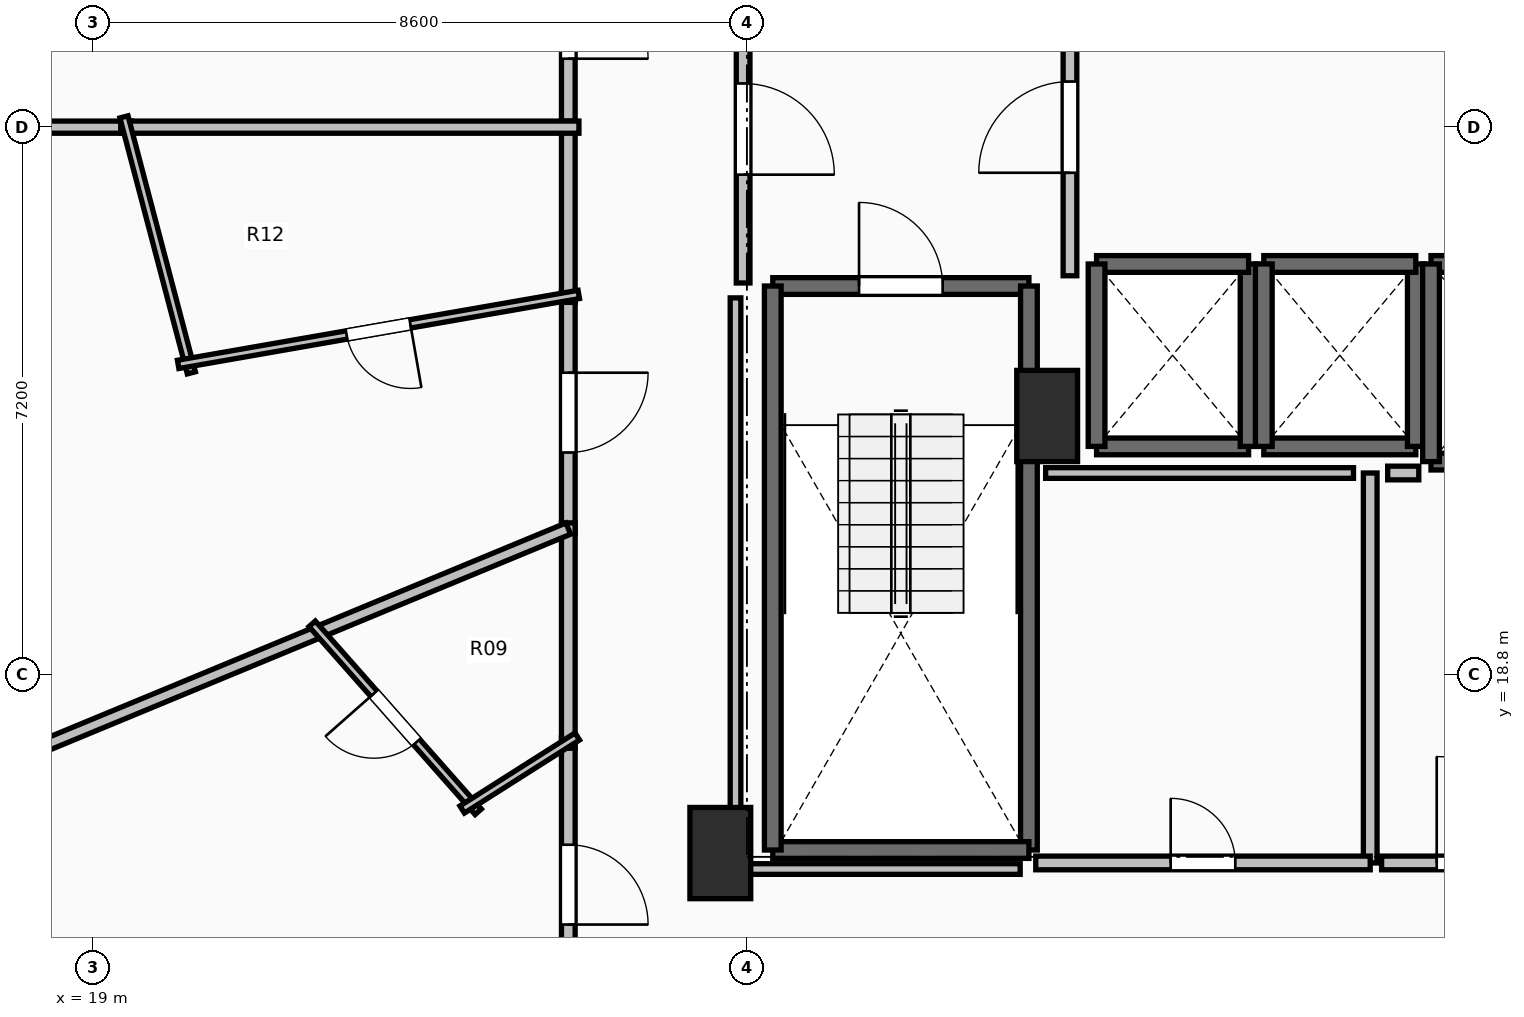
"""IFC4 building model, lengths in metres.
Left out: names, types, materials, properties, quantities, classifications, styles, units other than length and angle.
Written with IfcOpenShell. Run it as: python <this file> out.ifc"""

import sys

from ifc_helpers import new_model, si_unit, direction, frame, frame_2d, origin, origin_2d, place, context, subcontext, project, spatial, rectangle, extrude, element, fill, save


model = new_model("IFC4")
c1 = context("Model", 3, precision=1e-05, world=origin(), true_north=direction((0.0, 1.0)))
c2 = subcontext(c1, "Body", "Model", "MODEL_VIEW")
j1 = project(units=[si_unit("LENGTHUNIT", "METRE"), si_unit("PLANEANGLEUNIT", "RADIAN")], contexts=[c1])
p1 = place(None, origin())
s1 = spatial("IfcSite", under=j1, at=p1, CompositionType="ELEMENT")
p2 = place(p1, origin())
s2 = spatial("IfcBuilding", under=s1, at=p2, CompositionType="ELEMENT")
p3 = place(p2, frame((0.0, 0.0, 24.0)))
s3 = spatial("IfcBuildingStorey", under=s2, at=p3, CompositionType="ELEMENT", Elevation=24.0)
for number, where, z_axis, x_axis in (
    (1, (27.25, 16.45, 0.0), (0.0, 0.0, 1.0), (1.0, 0.0, 0.0)),
    (2, (31.55, 22.2, 0.0), (0.0, 0.0, 1.0), (1.0, 0.0, 0.0)),
):
    element("IfcColumn", number, at=place(p3, frame(where, z_axis=z_axis, x_axis=x_axis)), inside=s3, PredefinedType="PILASTER", context=c2, shape_type="SweptSolid", body=[
        extrude(rectangle(XDim=0.8, YDim=1.2, at=origin_2d()), origin(), (0.0, 0.0, 1.0), 3.5),
    ])
p4 = place(p3, frame((27.94, 23.91, 0.0), z_axis=(0.0, 0.0, 1.0), x_axis=(1.0, 0.0, 0.0)))
e3 = element("IfcWall", 3, at=p4, inside=s3, PredefinedType="SOLIDWALL", context=c2, shape_type="SweptSolid", body=[
    extrude(rectangle(XDim=3.37, YDim=0.22, at=frame_2d((1.685, 0.0))), origin(), (0.0, 0.0, 1.0), 3.24),
])
p5 = place(p4, frame((1.135, 0.0, 0.0)))
e4 = element("IfcOpeningElement", 4, at=p5, cuts=e3, PredefinedType="OPENING", context=c2, shape_type="SweptSolid", body=[
    extrude(rectangle(XDim=1.1, YDim=2.15, at=frame_2d((0.55, 1.075))), frame((0.0, 0.125, 0.0), z_axis=(0.0, -1.0, 0.0), x_axis=(1.0, 0.0, 0.0)), (0.0, 0.0, 1.0), 0.25),
])
p6 = place(p3, frame((31.31, 23.91, 0.0), z_axis=(0.0, 0.0, 1.0), x_axis=(0.0, -1.0, 0.0)))
e5 = element("IfcWall", 5, at=p6, inside=s3, PredefinedType="SOLIDWALL", context=c2, shape_type="SweptSolid", body=[
    extrude(rectangle(XDim=7.42, YDim=0.22, at=frame_2d((3.71, 0.0))), origin(), (0.0, 0.0, 1.0), 3.24),
])
p7 = place(p3, frame((31.31, 16.49, 0.0), z_axis=(0.0, 0.0, 1.0), x_axis=(-1.0, 0.0, 0.0)))
e6 = element("IfcWall", 6, at=p7, inside=s3, PredefinedType="SOLIDWALL", context=c2, shape_type="SweptSolid", body=[
    extrude(rectangle(XDim=3.37, YDim=0.22, at=frame_2d((1.685, 0.0))), origin(), (0.0, 0.0, 1.0), 3.24),
])
p8 = place(p3, frame((27.94, 16.49, 0.0), z_axis=(0.0, 0.0, 1.0), x_axis=(0.0, 1.0, 0.0)))
e7 = element("IfcWall", 7, at=p8, inside=s3, PredefinedType="SOLIDWALL", context=c2, shape_type="SweptSolid", body=[
    extrude(rectangle(XDim=7.42, YDim=0.22, at=frame_2d((3.71, 0.0))), origin(), (0.0, 0.0, 1.0), 3.24),
])
p9 = place(p3, frame((32.2, 21.8, 0.0), z_axis=(0.0, 0.0, 1.0), x_axis=(1.0, 0.0, 0.0)))
e8 = element("IfcWall", 8, at=p9, inside=s3, PredefinedType="SOLIDWALL", context=c2, shape_type="SweptSolid", body=[
    extrude(rectangle(XDim=2.0, YDim=0.22, at=frame_2d((1.0, 0.0))), origin(), (0.0, 0.0, 1.0), 3.24),
])
p10 = place(p3, frame((34.2, 21.8, 0.0), z_axis=(0.0, 0.0, 1.0), x_axis=(0.0, 1.0, 0.0)))
e9 = element("IfcWall", 9, at=p10, inside=s3, PredefinedType="SOLIDWALL", context=c2, shape_type="SweptSolid", body=[
    extrude(rectangle(XDim=2.4, YDim=0.22, at=frame_2d((1.2, 0.0))), origin(), (0.0, 0.0, 1.0), 3.24),
])
p11 = place(p3, frame((34.2, 24.2, 0.0), z_axis=(0.0, 0.0, 1.0), x_axis=(-1.0, 0.0, 0.0)))
e10 = element("IfcWall", 10, at=p11, inside=s3, PredefinedType="SOLIDWALL", context=c2, shape_type="SweptSolid", body=[
    extrude(rectangle(XDim=2.0, YDim=0.22, at=frame_2d((1.0, 0.0))), origin(), (0.0, 0.0, 1.0), 3.24),
])
p12 = place(p3, frame((32.2, 24.2, 0.0), z_axis=(0.0, 0.0, 1.0), x_axis=(0.0, -1.0, 0.0)))
e11 = element("IfcWall", 11, at=p12, inside=s3, PredefinedType="SOLIDWALL", context=c2, shape_type="SweptSolid", body=[
    extrude(rectangle(XDim=2.4, YDim=0.22, at=frame_2d((1.2, 0.0))), origin(), (0.0, 0.0, 1.0), 3.24),
])
p13 = place(p3, frame((34.4, 21.8, 0.0), z_axis=(0.0, 0.0, 1.0), x_axis=(1.0, 0.0, 0.0)))
e12 = element("IfcWall", 12, at=p13, inside=s3, PredefinedType="SOLIDWALL", context=c2, shape_type="SweptSolid", body=[
    extrude(rectangle(XDim=2.0, YDim=0.22, at=frame_2d((1.0, 0.0))), origin(), (0.0, 0.0, 1.0), 3.24),
])
p14 = place(p3, frame((36.4, 21.8, 0.0), z_axis=(0.0, 0.0, 1.0), x_axis=(0.0, 1.0, 0.0)))
e13 = element("IfcWall", 13, at=p14, inside=s3, PredefinedType="SOLIDWALL", context=c2, shape_type="SweptSolid", body=[
    extrude(rectangle(XDim=2.4, YDim=0.22, at=frame_2d((1.2, 0.0))), origin(), (0.0, 0.0, 1.0), 3.24),
])
p15 = place(p3, frame((36.4, 24.2, 0.0), z_axis=(0.0, 0.0, 1.0), x_axis=(-1.0, 0.0, 0.0)))
e14 = element("IfcWall", 14, at=p15, inside=s3, PredefinedType="SOLIDWALL", context=c2, shape_type="SweptSolid", body=[
    extrude(rectangle(XDim=2.0, YDim=0.22, at=frame_2d((1.0, 0.0))), origin(), (0.0, 0.0, 1.0), 3.24),
])
p16 = place(p3, frame((34.4, 24.2, 0.0), z_axis=(0.0, 0.0, 1.0), x_axis=(0.0, -1.0, 0.0)))
e15 = element("IfcWall", 15, at=p16, inside=s3, PredefinedType="SOLIDWALL", context=c2, shape_type="SweptSolid", body=[
    extrude(rectangle(XDim=2.4, YDim=0.22, at=frame_2d((1.2, 0.0))), origin(), (0.0, 0.0, 1.0), 3.24),
])
for number, where, z_axis, x_axis in (
    (16, (36.6, 21.6, 0.0), (0.0, 0.0, 1.0), (1.0, 0.0, 0.0)),
    (17, (38.8, 24.2, 0.0), (0.0, 0.0, 1.0), (-1.0, 0.0, 0.0)),
):
    element("IfcWall", number, at=place(p3, frame(where, z_axis=z_axis, x_axis=x_axis)), inside=s3, PredefinedType="SOLIDWALL", context=c2, shape_type="SweptSolid", body=[
        extrude(rectangle(XDim=2.2, YDim=0.22, at=frame_2d((1.1, 0.0))), origin(), (0.0, 0.0, 1.0), 3.24),
    ])
p17 = place(p3, frame((36.6, 24.2, 0.0), z_axis=(0.0, 0.0, 1.0), x_axis=(0.0, -1.0, 0.0)))
e18 = element("IfcWall", 18, at=p17, inside=s3, PredefinedType="SOLIDWALL", context=c2, shape_type="SweptSolid", body=[
    extrude(rectangle(XDim=2.6, YDim=0.22, at=frame_2d((1.3, 0.0))), origin(), (0.0, 0.0, 1.0), 3.24),
])
p18 = place(p3, frame((31.85, 24.045, 0.0), z_axis=(0.0, 0.0, 1.0), x_axis=(0.0, 1.0, 0.0)))
e19 = element("IfcWall", 19, at=p18, inside=s3, PredefinedType="PARTITIONING", context=c2, shape_type="SweptSolid", body=[
    extrude(rectangle(XDim=3.91, YDim=0.18, at=frame_2d((1.955, 0.0))), origin(), (0.0, 0.0, 1.0), 3.24),
])
p19 = place(p18, frame((1.355, 0.0, 0.0)))
e20 = element("IfcOpeningElement", 20, at=p19, cuts=e19, PredefinedType="OPENING", context=c2, shape_type="SweptSolid", body=[
    extrude(rectangle(XDim=1.2, YDim=2.15, at=frame_2d((0.6, 1.075))), frame((0.0, 0.105, 0.0), z_axis=(0.0, -1.0, 0.0), x_axis=(1.0, 0.0, 0.0)), (0.0, 0.0, 1.0), 0.21),
])
p20 = place(p3, frame((27.55, 28.0, 0.0), z_axis=(0.0, 0.0, 1.0), x_axis=(0.0, -1.0, 0.0)))
e21 = element("IfcWall", 21, at=p20, inside=s3, PredefinedType="PARTITIONING", context=c2, shape_type="SweptSolid", body=[
    extrude(rectangle(XDim=4.05, YDim=0.18, at=frame_2d((2.025, 0.0))), origin(), (0.0, 0.0, 1.0), 3.24),
])
p21 = place(p20, frame((1.425, 0.0, 0.0)))
e22 = element("IfcOpeningElement", 22, at=p21, cuts=e21, PredefinedType="OPENING", context=c2, shape_type="SweptSolid", body=[
    extrude(rectangle(XDim=1.2, YDim=2.15, at=frame_2d((0.6, 1.075))), frame((0.0, 0.105, 0.0), z_axis=(0.0, -1.0, 0.0), x_axis=(1.0, 0.0, 0.0)), (0.0, 0.0, 1.0), 0.21),
])
p22 = place(p3, frame((35.8, 16.32, 0.0), z_axis=(0.0, 0.0, 1.0), x_axis=(0.0, 1.0, 0.0)))
e23 = element("IfcWall", 23, at=p22, inside=s3, PredefinedType="PARTITIONING", context=c2, shape_type="SweptSolid", body=[
    extrude(rectangle(XDim=5.13, YDim=0.18, at=frame_2d((2.565, 0.0))), origin(), (0.0, 0.0, 1.0), 3.24),
])
p23 = place(p3, frame((31.4, 16.32, 0.0), z_axis=(0.0, 0.0, 1.0), x_axis=(1.0, 0.0, 0.0)))
e24 = element("IfcWall", 24, at=p23, inside=s3, PredefinedType="PARTITIONING", context=c2, shape_type="SweptSolid", body=[
    extrude(rectangle(XDim=4.4, YDim=0.18, at=frame_2d((2.2, 0.0))), origin(), (0.0, 0.0, 1.0), 3.24),
])
p24 = place(p23, frame((1.775, 0.0, 0.0)))
e25 = element("IfcOpeningElement", 25, at=p24, cuts=e24, PredefinedType="OPENING", context=c2, shape_type="SweptSolid", body=[
    extrude(rectangle(XDim=0.85, YDim=2.1, at=frame_2d((0.425, 1.05))), frame((0.0, 0.105, 0.0), z_axis=(0.0, -1.0, 0.0), x_axis=(1.0, 0.0, 0.0)), (0.0, 0.0, 1.0), 0.21),
])
p25 = place(p3, frame((35.95, 16.32, 0.0), z_axis=(0.0, 0.0, 1.0), x_axis=(1.0, 0.0, 0.0)))
e26 = element("IfcWall", 26, at=p25, inside=s3, PredefinedType="PARTITIONING", context=c2, shape_type="SweptSolid", body=[
    extrude(rectangle(XDim=2.85, YDim=0.18, at=frame_2d((1.425, 0.0))), origin(), (0.0, 0.0, 1.0), 3.24),
])
p26 = place(p25, frame((0.725, 0.0, 0.0)))
e27 = element("IfcOpeningElement", 27, at=p26, cuts=e26, PredefinedType="OPENING", context=c2, shape_type="SweptSolid", body=[
    extrude(rectangle(XDim=1.4, YDim=2.2, at=frame_2d((0.7, 1.1))), frame((0.0, 0.105, 0.0), z_axis=(0.0, -1.0, 0.0), x_axis=(1.0, 0.0, 0.0)), (0.0, 0.0, 1.0), 0.21),
])
p27 = place(p3, frame((25.25, 28.911, 0.0), z_axis=(0.0, 0.0, 1.0), x_axis=(0.0, -1.0, 0.0)))
e28 = element("IfcWall", 28, at=p27, inside=s3, PredefinedType="PARTITIONING", context=c2, shape_type="SweptSolid", body=[
    extrude(rectangle(XDim=2.971, YDim=0.18, at=frame_2d((1.485, 0.0))), origin(), (0.0, 0.0, 1.0), 2.432),
])
p28 = place(p27, frame((0.96, 0.0, 0.0)))
e29 = element("IfcOpeningElement", 29, at=p28, cuts=e28, PredefinedType="OPENING", context=c2, shape_type="SweptSolid", body=[
    extrude(rectangle(XDim=1.05, YDim=2.2, at=frame_2d((0.525, 1.1))), frame((0.0, 0.105, 0.0), z_axis=(0.0, -1.0, 0.0), x_axis=(1.0, 0.0, 0.0)), (0.0, 0.0, 1.0), 0.21),
])
p29 = place(p3, frame((25.25, 23.835, 0.0), z_axis=(0.0, 0.0, 1.0), x_axis=(0.0, -1.0, 0.0)))
e30 = element("IfcWall", 30, at=p29, inside=s3, PredefinedType="PARTITIONING", context=c2, shape_type="SweptSolid", body=[
    extrude(rectangle(XDim=3.181, YDim=0.18, at=frame_2d((1.59, 0.0))), origin(), (0.0, 0.0, 1.0), 3.24),
])
p30 = place(p29, frame((1.065, 0.0, 0.0)))
e31 = element("IfcOpeningElement", 31, at=p30, cuts=e30, PredefinedType="OPENING", context=c2, shape_type="SweptSolid", body=[
    extrude(rectangle(XDim=1.05, YDim=2.2, at=frame_2d((0.525, 1.1))), frame((0.0, 0.105, 0.0), z_axis=(0.0, -1.0, 0.0), x_axis=(1.0, 0.0, 0.0)), (0.0, 0.0, 1.0), 0.21),
])
p31 = place(p3, frame((25.25, 26.08, 0.0), z_axis=(0.0, 0.0, 1.0), x_axis=(0.0, -1.0, 0.0)))
e32 = element("IfcWall", 32, at=p31, inside=s3, PredefinedType="PARTITIONING", context=c2, shape_type="SweptSolid", body=[
    extrude(rectangle(XDim=2.385, YDim=0.18, at=frame_2d((1.192, 0.0))), origin(), (0.0, 0.0, 1.0), 3.24),
])
p32 = place(p3, frame((25.25, 17.969, 0.0), z_axis=(0.0, 0.0, 1.0), x_axis=(0.0, -1.0, 0.0)))
e33 = element("IfcWall", 33, at=p32, inside=s3, PredefinedType="PARTITIONING", context=c2, shape_type="SweptSolid", body=[
    extrude(rectangle(XDim=3.869, YDim=0.18, at=frame_2d((1.935, 0.0))), origin(), (0.0, 0.0, 1.0), 2.432),
])
p33 = place(p32, frame((1.409, 0.0, 0.0)))
e34 = element("IfcOpeningElement", 34, at=p33, cuts=e33, PredefinedType="OPENING", context=c2, shape_type="SweptSolid", body=[
    extrude(rectangle(XDim=1.05, YDim=2.2, at=frame_2d((0.525, 1.1))), frame((0.0, 0.105, 0.0), z_axis=(0.0, -1.0, 0.0), x_axis=(1.0, 0.0, 0.0)), (0.0, 0.0, 1.0), 0.21),
])
p34 = place(p3, frame((25.25, 20.794, 0.0), z_axis=(0.0, 0.0, 1.0), x_axis=(0.0, -1.0, 0.0)))
e35 = element("IfcWall", 35, at=p34, inside=s3, PredefinedType="PARTITIONING", context=c2, shape_type="SweptSolid", body=[
    extrude(rectangle(XDim=2.965, YDim=0.18, at=frame_2d((1.482, 0.0))), origin(), (0.0, 0.0, 1.0), 3.24),
])
p35 = place(p3, frame((8.451, 26.0, 0.0), z_axis=(0.0, 0.0, 1.0), x_axis=(1.0, 0.0, 0.0)))
e36 = element("IfcWall", 36, at=p35, inside=s3, PredefinedType="PARTITIONING", context=c2, shape_type="SweptSolid", body=[
    extrude(rectangle(XDim=11.051, YDim=0.16, at=frame_2d((5.525, 0.0))), origin(), (0.0, 0.0, 1.0), 2.432),
])
p36 = place(p3, frame((19.362, 26.0, 0.0), z_axis=(0.0, 0.0, 1.0), x_axis=(1.0, 0.0, 0.0)))
e37 = element("IfcWall", 37, at=p36, inside=s3, PredefinedType="PARTITIONING", context=c2, shape_type="SweptSolid", body=[
    extrude(rectangle(XDim=6.028, YDim=0.16, at=frame_2d((3.014, 0.0))), origin(), (0.0, 0.0, 1.0), 2.922),
])
p37 = place(p3, frame((20.291, 22.768, 0.0), z_axis=(0.0, 0.0, 1.0), x_axis=(-0.254476045764, 0.967079077497, 0.0)))
e38 = element("IfcWall", 38, at=p37, inside=s3, PredefinedType="PARTITIONING", context=c2, shape_type="SweptSolid", body=[
    extrude(rectangle(XDim=3.483, YDim=0.11, at=frame_2d((1.741, 0.0))), origin(), (0.0, 0.0, 1.0), 3.24),
])
p38 = place(p3, frame((25.388, 23.799, 0.0), z_axis=(0.0, 0.0, 1.0), x_axis=(-0.985100697644, -0.171978532096, 0.0)))
e39 = element("IfcWall", 39, at=p38, inside=s3, PredefinedType="PARTITIONING", context=c2, shape_type="SweptSolid", body=[
    extrude(rectangle(XDim=5.351, YDim=0.11, at=frame_2d((2.675, 0.0))), origin(), (0.0, 0.0, 1.0), 2.922),
])
p39 = place(p38, frame((2.25, 0.0, 0.0)))
e40 = element("IfcOpeningElement", 40, at=p39, cuts=e39, PredefinedType="OPENING", context=c2, shape_type="SweptSolid", body=[
    extrude(rectangle(XDim=0.85, YDim=2.1, at=frame_2d((0.425, 1.05))), frame((0.0, 0.07, 0.0), z_axis=(0.0, -1.0, 0.0), x_axis=(1.0, 0.0, 0.0)), (0.0, 0.0, 1.0), 0.14),
])
p40 = place(p3, frame((12.207, 15.316, 0.0), z_axis=(0.0, 0.0, 1.0), x_axis=(0.923866969846, 0.382713759914, 0.0)))
e41 = element("IfcWall", 41, at=p40, inside=s3, PredefinedType="PARTITIONING", context=c2, shape_type="SweptSolid", body=[
    extrude(rectangle(XDim=14.118, YDim=0.16, at=frame_2d((7.059, 0.0))), origin(), (0.0, 0.0, 1.0), 2.432),
])
p41 = place(p3, frame((24.065, 16.993, 0.0), z_axis=(0.0, 0.0, 1.0), x_axis=(-0.662059609276, 0.749451181709, 0.0)))
e42 = element("IfcWall", 42, at=p41, inside=s3, PredefinedType="PARTITIONING", context=c2, shape_type="SweptSolid", body=[
    extrude(rectangle(XDim=3.299, YDim=0.11, at=frame_2d((1.65, 0.0))), origin(), (0.0, 0.0, 1.0), 2.432),
])
p42 = place(p41, frame((1.225, 0.0, 0.0)))
e43 = element("IfcOpeningElement", 43, at=p42, cuts=e42, PredefinedType="OPENING", context=c2, shape_type="SweptSolid", body=[
    extrude(rectangle(XDim=0.85, YDim=2.1, at=frame_2d((0.425, 1.05))), frame((0.0, 0.07, 0.0), z_axis=(0.0, -1.0, 0.0), x_axis=(1.0, 0.0, 0.0)), (0.0, 0.0, 1.0), 0.14),
])
p43 = place(p3, frame((25.368, 17.984, 0.0), z_axis=(0.0, 0.0, 1.0), x_axis=(-0.844361394482, -0.535774052665, 0.0)))
e44 = element("IfcWall", 44, at=p43, inside=s3, PredefinedType="PARTITIONING", context=c2, shape_type="SweptSolid", body=[
    extrude(rectangle(XDim=1.793, YDim=0.11, at=frame_2d((0.897, 0.0))), origin(), (0.0, 0.0, 1.0), 2.432),
])
p44 = place(p3, frame((35.58, 21.45, 0.0), z_axis=(0.0, 0.0, 1.0), x_axis=(-1.0, 0.0, 0.0)))
e45 = element("IfcWall", 45, at=p44, inside=s3, PredefinedType="PARTITIONING", context=c2, shape_type="SweptSolid", body=[
    extrude(rectangle(XDim=4.05, YDim=0.14, at=frame_2d((2.025, 0.0))), origin(), (0.0, 0.0, 1.0), 3.24),
])
p45 = place(p3, frame((36.439, 21.45, 0.0), z_axis=(0.0, 0.0, 1.0), x_axis=(-1.0, 0.0, 0.0)))
e46 = element("IfcWall", 46, at=p45, inside=s3, PredefinedType="PARTITIONING", context=c2, shape_type="SweptSolid", body=[
    extrude(rectangle(XDim=0.409, YDim=0.18, at=frame_2d((0.205, 0.0))), origin(), (0.0, 0.0, 1.0), 3.24),
])
p46 = place(p3, frame((31.195, 16.24, 0.0), z_axis=(0.0, 0.0, 1.0), x_axis=(-1.0, 0.0, 0.0)))
e47 = element("IfcWall", 47, at=p46, inside=s3, PredefinedType="PARTITIONING", context=c2, shape_type="SweptSolid", body=[
    extrude(rectangle(XDim=3.745, YDim=0.14, at=frame_2d((1.873, 0.0))), origin(), (0.0, 0.0, 1.0), 2.432),
])
p47 = place(p3, frame((27.45, 16.24, 0.0), z_axis=(0.0, 0.0, 1.0), x_axis=(0.0, 1.0, 0.0)))
e48 = element("IfcWall", 48, at=p47, inside=s3, PredefinedType="PARTITIONING", context=c2, shape_type="SweptSolid", body=[
    extrude(rectangle(XDim=7.514, YDim=0.14, at=frame_2d((3.757, 0.0))), origin(), (0.0, 0.0, 1.0), 2.432),
])
p48 = place(p5, origin())
e49 = element("IfcDoor", 49, at=p48, inside=s3, OperationType="SINGLE_SWING_LEFT", PredefinedType="DOOR", context=c2, shape_type="SweptSolid", body=[
    extrude(rectangle(XDim=1.1, YDim=2.15, at=frame_2d((0.55, 1.075))), frame((0.0, 0.025, 0.0), z_axis=(0.0, -1.0, 0.0), x_axis=(1.0, 0.0, 0.0)), (0.0, 0.0, 1.0), 0.05),
])
fill(e4, e49)
p49 = place(p19, origin())
e50 = element("IfcDoor", 50, at=p49, inside=s3, OperationType="SINGLE_SWING_LEFT", PredefinedType="DOOR", context=c2, shape_type="SweptSolid", body=[
    extrude(rectangle(XDim=1.2, YDim=2.15, at=frame_2d((0.6, 1.075))), frame((0.0, 0.025, 0.0), z_axis=(0.0, -1.0, 0.0), x_axis=(1.0, 0.0, 0.0)), (0.0, 0.0, 1.0), 0.05),
])
fill(e20, e50)
p50 = place(p21, origin())
e51 = element("IfcDoor", 51, at=p50, inside=s3, OperationType="SINGLE_SWING_RIGHT", PredefinedType="DOOR", context=c2, shape_type="SweptSolid", body=[
    extrude(rectangle(XDim=1.2, YDim=2.15, at=frame_2d((0.6, 1.075))), frame((0.0, 0.025, 0.0), z_axis=(0.0, -1.0, 0.0), x_axis=(1.0, 0.0, 0.0)), (0.0, 0.0, 1.0), 0.05),
])
fill(e22, e51)
p51 = place(p24, origin())
e52 = element("IfcDoor", 52, at=p51, inside=s3, OperationType="SINGLE_SWING_LEFT", PredefinedType="DOOR", context=c2, shape_type="SweptSolid", body=[
    extrude(rectangle(XDim=0.85, YDim=2.1, at=frame_2d((0.425, 1.05))), frame((0.0, 0.025, 0.0), z_axis=(0.0, -1.0, 0.0), x_axis=(1.0, 0.0, 0.0)), (0.0, 0.0, 1.0), 0.05),
])
fill(e25, e52)
p52 = place(p26, origin())
e53 = element("IfcDoor", 53, at=p52, inside=s3, OperationType="DOUBLE_SWING_LEFT", PredefinedType="DOOR", context=c2, shape_type="SweptSolid", body=[
    extrude(rectangle(XDim=1.4, YDim=2.2, at=frame_2d((0.7, 1.1))), frame((0.0, 0.025, 0.0), z_axis=(0.0, -1.0, 0.0), x_axis=(1.0, 0.0, 0.0)), (0.0, 0.0, 1.0), 0.05),
])
fill(e27, e53)
p53 = place(p28, origin())
e54 = element("IfcDoor", 54, at=p53, inside=s3, OperationType="SINGLE_SWING_RIGHT", PredefinedType="DOOR", context=c2, shape_type="SweptSolid", body=[
    extrude(rectangle(XDim=1.05, YDim=2.2, at=frame_2d((0.525, 1.1))), frame((0.0, 0.025, 0.0), z_axis=(0.0, -1.0, 0.0), x_axis=(1.0, 0.0, 0.0)), (0.0, 0.0, 1.0), 0.05),
])
fill(e29, e54)
p54 = place(p30, origin())
e55 = element("IfcDoor", 55, at=p54, inside=s3, OperationType="SINGLE_SWING_LEFT", PredefinedType="DOOR", context=c2, shape_type="SweptSolid", body=[
    extrude(rectangle(XDim=1.05, YDim=2.2, at=frame_2d((0.525, 1.1))), frame((0.0, 0.025, 0.0), z_axis=(0.0, -1.0, 0.0), x_axis=(1.0, 0.0, 0.0)), (0.0, 0.0, 1.0), 0.05),
])
fill(e31, e55)
p55 = place(p33, origin())
e56 = element("IfcDoor", 56, at=p55, inside=s3, OperationType="SINGLE_SWING_RIGHT", PredefinedType="DOOR", context=c2, shape_type="SweptSolid", body=[
    extrude(rectangle(XDim=1.05, YDim=2.2, at=frame_2d((0.525, 1.1))), frame((0.0, 0.025, 0.0), z_axis=(0.0, -1.0, 0.0), x_axis=(1.0, 0.0, 0.0)), (0.0, 0.0, 1.0), 0.05),
])
fill(e34, e56)
p56 = place(p39, origin())
e57 = element("IfcDoor", 57, at=p56, inside=s3, OperationType="SINGLE_SWING_LEFT", PredefinedType="DOOR", context=c2, shape_type="SweptSolid", body=[
    extrude(rectangle(XDim=0.85, YDim=2.1, at=frame_2d((0.425, 1.05))), frame((0.0, 0.025, 0.0), z_axis=(0.0, -1.0, 0.0), x_axis=(1.0, 0.0, 0.0)), (0.0, 0.0, 1.0), 0.05),
])
fill(e40, e57)
p57 = place(p42, origin())
e58 = element("IfcDoor", 58, at=p57, inside=s3, OperationType="SINGLE_SWING_RIGHT", PredefinedType="DOOR", context=c2, shape_type="SweptSolid", body=[
    extrude(rectangle(XDim=0.85, YDim=2.1, at=frame_2d((0.425, 1.05))), frame((0.0, 0.025, 0.0), z_axis=(0.0, -1.0, 0.0), x_axis=(1.0, 0.0, 0.0)), (0.0, 0.0, 1.0), 0.05),
])
fill(e43, e58)
save(model, sys.argv[1])
